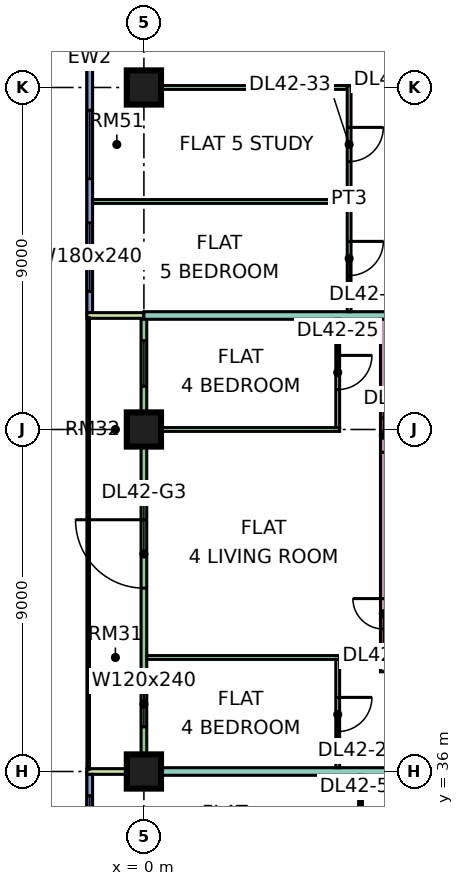
"""IFC4 building model, lengths in metres.
Left out: names, types, materials, properties, quantities, classifications, styles, units other than length and angle.
Written with IfcOpenShell. Run it as: python <this file> out.ifc"""

import sys

from ifc_helpers import new_model, si_unit, direction, frame, frame_2d, origin, origin_2d, place, context, subcontext, project, spatial, rectangle, extrude, element, fill, save


model = new_model("IFC4")
c1 = context("Model", 3, precision=1e-05, world=origin(), true_north=direction((0.0, 1.0)))
c2 = subcontext(c1, "Body", "Model", "MODEL_VIEW")
j1 = project(units=[si_unit("LENGTHUNIT", "METRE"), si_unit("PLANEANGLEUNIT", "RADIAN")], contexts=[c1])
p1 = place(None, origin())
s1 = spatial("IfcSite", under=j1, at=p1, CompositionType="ELEMENT")
p2 = place(p1, origin())
s2 = spatial("IfcBuilding", under=s1, at=p2, CompositionType="ELEMENT")
p3 = place(p2, frame((0.0, 0.0, 183.65)))
s3 = spatial("IfcBuildingStorey", under=s2, at=p3, CompositionType="ELEMENT", Elevation=183.65)
p4 = place(p3, frame((0.0, 36.0, 0.0), z_axis=(0.0, 0.0, 1.0), x_axis=(1.0, 0.0, 0.0)))
e1 = element("IfcColumn", 1, at=p4, inside=s3, PredefinedType="COLUMN", context=c2, shape_type="SweptSolid", body=[
    extrude(rectangle(XDim=0.9, YDim=0.9, at=origin_2d()), origin(), (0.0, 0.0, 1.0), 3.75),
])
p5 = place(p3, frame((0.0, 45.0, 0.0), z_axis=(0.0, 0.0, 1.0), x_axis=(1.0, 0.0, 0.0)))
e2 = element("IfcColumn", 2, at=p5, inside=s3, PredefinedType="COLUMN", context=c2, shape_type="SweptSolid", body=[
    extrude(rectangle(XDim=0.9, YDim=0.9, at=origin_2d()), origin(), (0.0, 0.0, 1.0), 3.75),
])
p6 = place(p3, frame((0.0, 54.0, 0.0), z_axis=(0.0, 0.0, 1.0), x_axis=(1.0, 0.0, 0.0)))
e3 = element("IfcColumn", 3, at=p6, inside=s3, PredefinedType="COLUMN", context=c2, shape_type="SweptSolid", body=[
    extrude(rectangle(XDim=0.9, YDim=0.9, at=origin_2d()), origin(), (0.0, 0.0, 1.0), 3.75),
])
p7 = place(p3, frame((-1.425, 61.5, 0.0), z_axis=(0.0, 0.0, 1.0), x_axis=(0.0, -1.0, 0.0)))
e4 = element("IfcWall", 4, at=p7, inside=s3, PredefinedType="SOLIDWALL", context=c2, shape_type="SweptSolid", body=[
    extrude(rectangle(XDim=13.425, YDim=0.15, at=frame_2d((6.712, 0.0))), origin(), (0.0, 0.0, 1.0), 3.35),
])
p8 = place(p7, frame((0.3, 0.0, 0.45)))
e5 = element("IfcOpeningElement", 5, at=p8, cuts=e4, PredefinedType="OPENING", context=c2, shape_type="SweptSolid", body=[
    extrude(rectangle(XDim=0.9, YDim=2.4, at=frame_2d((0.45, 1.2))), frame((0.0, 0.085, 0.0), z_axis=(0.0, -1.0, 0.0), x_axis=(1.0, 0.0, 0.0)), (0.0, 0.0, 1.0), 0.17),
])
p9 = place(p7, frame((2.1, 0.0, 0.45)))
e6 = element("IfcOpeningElement", 6, at=p9, cuts=e4, PredefinedType="OPENING", context=c2, shape_type="SweptSolid", body=[
    extrude(rectangle(XDim=4.8, YDim=2.4, at=frame_2d((2.4, 1.2))), frame((0.0, 0.085, 0.0), z_axis=(0.0, -1.0, 0.0), x_axis=(1.0, 0.0, 0.0)), (0.0, 0.0, 1.0), 0.17),
])
p10 = place(p7, frame((8.1, 0.0, 0.45)))
e7 = element("IfcOpeningElement", 7, at=p10, cuts=e4, PredefinedType="OPENING", context=c2, shape_type="SweptSolid", body=[
    extrude(rectangle(XDim=1.8, YDim=2.4, at=frame_2d((0.9, 1.2))), frame((0.0, 0.085, 0.0), z_axis=(0.0, -1.0, 0.0), x_axis=(1.0, 0.0, 0.0)), (0.0, 0.0, 1.0), 0.17),
])
p11 = place(p7, frame((11.062, 0.0, 0.45)))
e8 = element("IfcOpeningElement", 8, at=p11, cuts=e4, PredefinedType="OPENING", context=c2, shape_type="SweptSolid", body=[
    extrude(rectangle(XDim=1.8, YDim=2.4, at=frame_2d((0.9, 1.2))), frame((0.0, 0.085, 0.0), z_axis=(0.0, -1.0, 0.0), x_axis=(1.0, 0.0, 0.0)), (0.0, 0.0, 1.0), 0.17),
])
p12 = place(p3, frame((0.0, 47.925, 0.0), z_axis=(0.0, 0.0, 1.0), x_axis=(0.0, -1.0, 0.0)))
e9 = element("IfcWall", 9, at=p12, inside=s3, PredefinedType="SOLIDWALL", context=c2, shape_type="SweptSolid", body=[
    extrude(rectangle(XDim=11.85, YDim=0.15, at=frame_2d((5.925, 0.0))), origin(), (0.0, 0.0, 1.0), 3.35),
])
p13 = place(p12, frame((0.587, 0.0, 0.45)))
e10 = element("IfcOpeningElement", 10, at=p13, cuts=e9, PredefinedType="OPENING", context=c2, shape_type="SweptSolid", body=[
    extrude(rectangle(XDim=1.2, YDim=2.4, at=frame_2d((0.6, 1.2))), frame((0.0, 0.085, 0.0), z_axis=(0.0, -1.0, 0.0), x_axis=(1.0, 0.0, 0.0)), (0.0, 0.0, 1.0), 0.17),
])
p14 = place(p12, frame((5.3, 0.0, 0.0)))
e11 = element("IfcOpeningElement", 11, at=p14, cuts=e9, PredefinedType="OPENING", context=c2, shape_type="SweptSolid", body=[
    extrude(rectangle(XDim=1.8, YDim=2.4, at=frame_2d((0.9, 1.2))), frame((0.0, 0.085, 0.0), z_axis=(0.0, -1.0, 0.0), x_axis=(1.0, 0.0, 0.0)), (0.0, 0.0, 1.0), 0.17),
])
p15 = place(p12, frame((9.55, 0.0, 0.45)))
e12 = element("IfcOpeningElement", 12, at=p15, cuts=e9, PredefinedType="OPENING", context=c2, shape_type="SweptSolid", body=[
    extrude(rectangle(XDim=1.2, YDim=2.4, at=frame_2d((0.6, 1.2))), frame((0.0, 0.085, 0.0), z_axis=(0.0, -1.0, 0.0), x_axis=(1.0, 0.0, 0.0)), (0.0, 0.0, 1.0), 0.17),
])
for number, where, z_axis, x_axis in (
    (13, (-1.5, 48.0, 0.0), (0.0, 0.0, 1.0), (1.0, 0.0, 0.0)),
    (14, (-1.5, 36.0, 0.0), (0.0, 0.0, 1.0), (1.0, 0.0, 0.0)),
):
    element("IfcWall", number, at=place(p3, frame(where, z_axis=z_axis, x_axis=x_axis)), inside=s3, PredefinedType="SOLIDWALL", context=c2, shape_type="SweptSolid", body=[
        extrude(rectangle(XDim=1.5, YDim=0.15, at=frame_2d((0.75, 0.0))), origin(), (0.0, 0.0, 1.0), 3.35),
    ])
p16 = place(p3, frame((-1.425, 35.925, 0.0), z_axis=(0.0, 0.0, 1.0), x_axis=(0.0, -1.0, 0.0)))
e15 = element("IfcWall", 15, at=p16, inside=s3, PredefinedType="SOLIDWALL", context=c2, shape_type="SweptSolid", body=[
    extrude(rectangle(XDim=11.85, YDim=0.15, at=frame_2d((5.925, 0.0))), origin(), (0.0, 0.0, 1.0), 3.35),
])
p17 = place(p16, frame((0.562, 0.0, 0.45)))
e16 = element("IfcOpeningElement", 16, at=p17, cuts=e15, PredefinedType="OPENING", context=c2, shape_type="SweptSolid", body=[
    extrude(rectangle(XDim=1.8, YDim=2.4, at=frame_2d((0.9, 1.2))), frame((0.0, 0.085, 0.0), z_axis=(0.0, -1.0, 0.0), x_axis=(1.0, 0.0, 0.0)), (0.0, 0.0, 1.0), 0.17),
])
p18 = place(p16, frame((3.525, 0.0, 0.45)))
e17 = element("IfcOpeningElement", 17, at=p18, cuts=e15, PredefinedType="OPENING", context=c2, shape_type="SweptSolid", body=[
    extrude(rectangle(XDim=1.8, YDim=2.4, at=frame_2d((0.9, 1.2))), frame((0.0, 0.085, 0.0), z_axis=(0.0, -1.0, 0.0), x_axis=(1.0, 0.0, 0.0)), (0.0, 0.0, 1.0), 0.17),
])
p19 = place(p16, frame((7.387, 0.0, 0.45)))
e18 = element("IfcOpeningElement", 18, at=p19, cuts=e15, PredefinedType="OPENING", context=c2, shape_type="SweptSolid", body=[
    extrude(rectangle(XDim=3.0, YDim=2.4, at=frame_2d((1.5, 1.2))), frame((0.0, 0.085, 0.0), z_axis=(0.0, -1.0, 0.0), x_axis=(1.0, 0.0, 0.0)), (0.0, 0.0, 1.0), 0.17),
])
e19 = element("IfcWall", 19, at=p4, inside=s3, PredefinedType="PARTITIONING", context=c2, shape_type="SweptSolid", body=[
    extrude(rectangle(XDim=9.5, YDim=0.2, at=frame_2d((4.75, 0.0))), origin(), (0.0, 0.0, 1.0), 3.35),
])
p20 = place(p3, frame((0.0, 48.0, 0.0), z_axis=(0.0, 0.0, 1.0), x_axis=(1.0, 0.0, 0.0)))
e20 = element("IfcWall", 20, at=p20, inside=s3, PredefinedType="PARTITIONING", context=c2, shape_type="SweptSolid", body=[
    extrude(rectangle(XDim=6.375, YDim=0.2, at=frame_2d((3.188, 0.0))), origin(), (0.0, 0.0, 1.0), 3.35),
])
p21 = place(p3, frame((-1.35, 51.0, 0.0), z_axis=(0.0, 0.0, 1.0), x_axis=(1.0, 0.0, 0.0)))
e21 = element("IfcWall", 21, at=p21, inside=s3, PredefinedType="PARTITIONING", context=c2, shape_type="SweptSolid", body=[
    extrude(rectangle(XDim=6.7, YDim=0.1, at=frame_2d((3.35, 0.0))), origin(), (0.0, 0.0, 1.0), 3.35),
])
e22 = element("IfcWall", 22, at=p6, inside=s3, PredefinedType="PARTITIONING", context=c2, shape_type="SweptSolid", body=[
    extrude(rectangle(XDim=5.35, YDim=0.1, at=frame_2d((2.675, 0.0))), origin(), (0.0, 0.0, 1.0), 3.35),
])
for number, where, z_axis, x_axis in (
    (23, (0.074, 39.0, 0.0), (0.0, 0.0, 1.0), (1.0, 0.0, 0.0)),
    (24, (0.074, 45.0, 0.0), (0.0, 0.0, 1.0), (1.0, 0.0, 0.0)),
):
    element("IfcWall", number, at=place(p3, frame(where, z_axis=z_axis, x_axis=x_axis)), inside=s3, PredefinedType="PARTITIONING", context=c2, shape_type="SweptSolid", body=[
        extrude(rectangle(XDim=5.076, YDim=0.1, at=frame_2d((2.538, 0.0))), origin(), (0.0, 0.0, 1.0), 3.35),
    ])
p22 = place(p3, frame((5.1, 36.1, 0.0), z_axis=(0.0, 0.0, 1.0), x_axis=(0.0, 1.0, 0.0)))
e25 = element("IfcWall", 25, at=p22, inside=s3, PredefinedType="PARTITIONING", context=c2, shape_type="SweptSolid", body=[
    extrude(rectangle(XDim=2.85, YDim=0.1, at=frame_2d((1.425, 0.0))), origin(), (0.0, 0.0, 1.0), 3.35),
])
p23 = place(p22, frame((0.95, 0.0, 0.0)))
e26 = element("IfcOpeningElement", 26, at=p23, cuts=e25, PredefinedType="OPENING", context=c2, shape_type="SweptSolid", body=[
    extrude(rectangle(XDim=0.9, YDim=2.1, at=frame_2d((0.45, 1.05))), frame((0.0, 0.06, 0.0), z_axis=(0.0, -1.0, 0.0), x_axis=(1.0, 0.0, 0.0)), (0.0, 0.0, 1.0), 0.12),
])
p24 = place(p3, frame((5.1, 45.05, 0.0), z_axis=(0.0, 0.0, 1.0), x_axis=(0.0, 1.0, 0.0)))
e27 = element("IfcWall", 27, at=p24, inside=s3, PredefinedType="PARTITIONING", context=c2, shape_type="SweptSolid", body=[
    extrude(rectangle(XDim=2.85, YDim=0.1, at=frame_2d((1.425, 0.0))), origin(), (0.0, 0.0, 1.0), 3.35),
])
p25 = place(p24, frame((1.0, 0.0, 0.0)))
e28 = element("IfcOpeningElement", 28, at=p25, cuts=e27, PredefinedType="OPENING", context=c2, shape_type="SweptSolid", body=[
    extrude(rectangle(XDim=0.9, YDim=2.1, at=frame_2d((0.45, 1.05))), frame((0.0, 0.06, 0.0), z_axis=(0.0, -1.0, 0.0), x_axis=(1.0, 0.0, 0.0)), (0.0, 0.0, 1.0), 0.12),
])
p26 = place(p3, frame((5.4, 48.1, 0.0), z_axis=(0.0, 0.0, 1.0), x_axis=(0.0, 1.0, 0.0)))
e29 = element("IfcWall", 29, at=p26, inside=s3, PredefinedType="PARTITIONING", context=c2, shape_type="SweptSolid", body=[
    extrude(rectangle(XDim=5.95, YDim=0.1, at=frame_2d((2.975, 0.0))), origin(), (0.0, 0.0, 1.0), 3.35),
])
p27 = place(p26, frame((0.95, 0.0, 0.0)))
e30 = element("IfcOpeningElement", 30, at=p27, cuts=e29, PredefinedType="OPENING", context=c2, shape_type="SweptSolid", body=[
    extrude(rectangle(XDim=0.9, YDim=2.1, at=frame_2d((0.45, 1.05))), frame((0.0, 0.06, 0.0), z_axis=(0.0, -1.0, 0.0), x_axis=(1.0, 0.0, 0.0)), (0.0, 0.0, 1.0), 0.12),
])
p28 = place(p26, frame((3.95, 0.0, 0.0)))
e31 = element("IfcOpeningElement", 31, at=p28, cuts=e29, PredefinedType="OPENING", context=c2, shape_type="SweptSolid", body=[
    extrude(rectangle(XDim=0.9, YDim=2.1, at=frame_2d((0.45, 1.05))), frame((0.0, 0.06, 0.0), z_axis=(0.0, -1.0, 0.0), x_axis=(1.0, 0.0, 0.0)), (0.0, 0.0, 1.0), 0.12),
])
p29 = place(p3, frame((5.7, 29.95, 0.0), z_axis=(0.0, 0.0, 1.0), x_axis=(0.0, 1.0, 0.0)))
e32 = element("IfcWall", 32, at=p29, inside=s3, PredefinedType="PARTITIONING", context=c2, shape_type="SweptSolid", body=[
    extrude(rectangle(XDim=5.95, YDim=0.1, at=frame_2d((2.975, 0.0))), origin(), (0.0, 0.0, 1.0), 3.35),
])
p30 = place(p29, frame((1.1, 0.0, 0.0)))
e33 = element("IfcOpeningElement", 33, at=p30, cuts=e32, PredefinedType="OPENING", context=c2, shape_type="SweptSolid", body=[
    extrude(rectangle(XDim=0.9, YDim=2.1, at=frame_2d((0.45, 1.05))), frame((0.0, 0.06, 0.0), z_axis=(0.0, -1.0, 0.0), x_axis=(1.0, 0.0, 0.0)), (0.0, 0.0, 1.0), 0.12),
])
p31 = place(p29, frame((4.1, 0.0, 0.0)))
e34 = element("IfcOpeningElement", 34, at=p31, cuts=e32, PredefinedType="OPENING", context=c2, shape_type="SweptSolid", body=[
    extrude(rectangle(XDim=0.9, YDim=2.1, at=frame_2d((0.45, 1.05))), frame((0.0, 0.06, 0.0), z_axis=(0.0, -1.0, 0.0), x_axis=(1.0, 0.0, 0.0)), (0.0, 0.0, 1.0), 0.12),
])
p32 = place(p3, frame((6.3, 38.625, 0.0), z_axis=(0.0, 0.0, 1.0), x_axis=(0.0, 1.0, 0.0)))
e35 = element("IfcWall", 35, at=p32, inside=s3, PredefinedType="PARTITIONING", context=c2, shape_type="SweptSolid", body=[
    extrude(rectangle(XDim=9.275, YDim=0.15, at=frame_2d((4.637, 0.0))), origin(), (0.0, 0.0, 1.0), 3.35),
])
p33 = place(p32, frame((1.125, 0.0, 0.0)))
e36 = element("IfcOpeningElement", 36, at=p33, cuts=e35, PredefinedType="OPENING", context=c2, shape_type="SweptSolid", body=[
    extrude(rectangle(XDim=0.8, YDim=2.1, at=frame_2d((0.4, 1.05))), frame((0.0, 0.085, 0.0), z_axis=(0.0, -1.0, 0.0), x_axis=(1.0, 0.0, 0.0)), (0.0, 0.0, 1.0), 0.17),
])
p34 = place(p32, frame((5.775, 0.0, 0.0)))
e37 = element("IfcOpeningElement", 37, at=p34, cuts=e35, PredefinedType="OPENING", context=c2, shape_type="SweptSolid", body=[
    extrude(rectangle(XDim=0.9, YDim=2.1, at=frame_2d((0.45, 1.05))), frame((0.0, 0.085, 0.0), z_axis=(0.0, -1.0, 0.0), x_axis=(1.0, 0.0, 0.0)), (0.0, 0.0, 1.0), 0.17),
])
p35 = place(p9, origin())
e38 = element("IfcWindow", 38, at=p35, inside=s3, PartitioningType="SINGLE_PANEL", PredefinedType="WINDOW", context=c2, shape_type="SweptSolid", body=[
    extrude(rectangle(XDim=4.8, YDim=2.4, at=frame_2d((2.4, 1.2))), frame((0.0, 0.03, 0.0), z_axis=(0.0, -1.0, 0.0), x_axis=(1.0, 0.0, 0.0)), (0.0, 0.0, 1.0), 0.06),
])
fill(e6, e38)
p36 = place(p10, origin())
e39 = element("IfcWindow", 39, at=p36, inside=s3, PartitioningType="SINGLE_PANEL", PredefinedType="WINDOW", context=c2, shape_type="SweptSolid", body=[
    extrude(rectangle(XDim=1.8, YDim=2.4, at=frame_2d((0.9, 1.2))), frame((0.0, 0.03, 0.0), z_axis=(0.0, -1.0, 0.0), x_axis=(1.0, 0.0, 0.0)), (0.0, 0.0, 1.0), 0.06),
])
fill(e7, e39)
p37 = place(p11, origin())
e40 = element("IfcWindow", 40, at=p37, inside=s3, PartitioningType="SINGLE_PANEL", PredefinedType="WINDOW", context=c2, shape_type="SweptSolid", body=[
    extrude(rectangle(XDim=1.8, YDim=2.4, at=frame_2d((0.9, 1.2))), frame((0.0, 0.03, 0.0), z_axis=(0.0, -1.0, 0.0), x_axis=(1.0, 0.0, 0.0)), (0.0, 0.0, 1.0), 0.06),
])
fill(e8, e40)
p38 = place(p13, origin())
e41 = element("IfcWindow", 41, at=p38, inside=s3, PartitioningType="SINGLE_PANEL", PredefinedType="WINDOW", context=c2, shape_type="SweptSolid", body=[
    extrude(rectangle(XDim=1.2, YDim=2.4, at=frame_2d((0.6, 1.2))), frame((0.0, 0.03, 0.0), z_axis=(0.0, -1.0, 0.0), x_axis=(1.0, 0.0, 0.0)), (0.0, 0.0, 1.0), 0.06),
])
fill(e10, e41)
p39 = place(p14, frame((1.8, 0.0, 0.0), z_axis=(0.0, 0.0, 1.0), x_axis=(-1.0, 0.0, 0.0)))
e42 = element("IfcDoor", 42, at=p39, inside=s3, OperationType="DOUBLE_DOOR_SINGLE_SWING", PredefinedType="DOOR", context=c2, shape_type="SweptSolid", body=[
    extrude(rectangle(XDim=1.8, YDim=2.4, at=frame_2d((0.9, 1.2))), frame((0.0, 0.025, 0.0), z_axis=(0.0, -1.0, 0.0), x_axis=(1.0, 0.0, 0.0)), (0.0, 0.0, 1.0), 0.05),
])
fill(e11, e42)
p40 = place(p15, origin())
e43 = element("IfcWindow", 43, at=p40, inside=s3, PartitioningType="SINGLE_PANEL", PredefinedType="WINDOW", context=c2, shape_type="SweptSolid", body=[
    extrude(rectangle(XDim=1.2, YDim=2.4, at=frame_2d((0.6, 1.2))), frame((0.0, 0.03, 0.0), z_axis=(0.0, -1.0, 0.0), x_axis=(1.0, 0.0, 0.0)), (0.0, 0.0, 1.0), 0.06),
])
fill(e12, e43)
p41 = place(p17, origin())
e44 = element("IfcWindow", 44, at=p41, inside=s3, PartitioningType="SINGLE_PANEL", PredefinedType="WINDOW", context=c2, shape_type="SweptSolid", body=[
    extrude(rectangle(XDim=1.8, YDim=2.4, at=frame_2d((0.9, 1.2))), frame((0.0, 0.03, 0.0), z_axis=(0.0, -1.0, 0.0), x_axis=(1.0, 0.0, 0.0)), (0.0, 0.0, 1.0), 0.06),
])
fill(e16, e44)
p42 = place(p33, frame((0.8, 0.0, 0.0), z_axis=(0.0, 0.0, 1.0), x_axis=(-1.0, 0.0, 0.0)))
e45 = element("IfcDoor", 45, at=p42, inside=s3, OperationType="SINGLE_SWING_RIGHT", PredefinedType="DOOR", context=c2, shape_type="SweptSolid", body=[
    extrude(rectangle(XDim=0.8, YDim=2.1, at=frame_2d((0.4, 1.05))), frame((0.0, 0.025, 0.0), z_axis=(0.0, -1.0, 0.0), x_axis=(1.0, 0.0, 0.0)), (0.0, 0.0, 1.0), 0.05),
])
fill(e36, e45)
p43 = place(p23, origin())
e46 = element("IfcDoor", 46, at=p43, inside=s3, OperationType="SINGLE_SWING_RIGHT", PredefinedType="DOOR", context=c2, shape_type="SweptSolid", body=[
    extrude(rectangle(XDim=0.9, YDim=2.1, at=frame_2d((0.45, 1.05))), frame((0.0, 0.025, 0.0), z_axis=(0.0, -1.0, 0.0), x_axis=(1.0, 0.0, 0.0)), (0.0, 0.0, 1.0), 0.05),
])
fill(e26, e46)
p44 = place(p25, origin())
e47 = element("IfcDoor", 47, at=p44, inside=s3, OperationType="SINGLE_SWING_RIGHT", PredefinedType="DOOR", context=c2, shape_type="SweptSolid", body=[
    extrude(rectangle(XDim=0.9, YDim=2.1, at=frame_2d((0.45, 1.05))), frame((0.0, 0.025, 0.0), z_axis=(0.0, -1.0, 0.0), x_axis=(1.0, 0.0, 0.0)), (0.0, 0.0, 1.0), 0.05),
])
fill(e28, e47)
p45 = place(p34, frame((0.9, 0.0, 0.0), z_axis=(0.0, 0.0, 1.0), x_axis=(-1.0, 0.0, 0.0)))
e48 = element("IfcDoor", 48, at=p45, inside=s3, OperationType="SINGLE_SWING_LEFT", PredefinedType="DOOR", context=c2, shape_type="SweptSolid", body=[
    extrude(rectangle(XDim=0.9, YDim=2.1, at=frame_2d((0.45, 1.05))), frame((0.0, 0.025, 0.0), z_axis=(0.0, -1.0, 0.0), x_axis=(1.0, 0.0, 0.0)), (0.0, 0.0, 1.0), 0.05),
])
fill(e37, e48)
p46 = place(p27, origin())
e49 = element("IfcDoor", 49, at=p46, inside=s3, OperationType="SINGLE_SWING_RIGHT", PredefinedType="DOOR", context=c2, shape_type="SweptSolid", body=[
    extrude(rectangle(XDim=0.9, YDim=2.1, at=frame_2d((0.45, 1.05))), frame((0.0, 0.025, 0.0), z_axis=(0.0, -1.0, 0.0), x_axis=(1.0, 0.0, 0.0)), (0.0, 0.0, 1.0), 0.05),
])
fill(e30, e49)
p47 = place(p28, origin())
e50 = element("IfcDoor", 50, at=p47, inside=s3, OperationType="SINGLE_SWING_RIGHT", PredefinedType="DOOR", context=c2, shape_type="SweptSolid", body=[
    extrude(rectangle(XDim=0.9, YDim=2.1, at=frame_2d((0.45, 1.05))), frame((0.0, 0.025, 0.0), z_axis=(0.0, -1.0, 0.0), x_axis=(1.0, 0.0, 0.0)), (0.0, 0.0, 1.0), 0.05),
])
fill(e31, e50)
save(model, sys.argv[1])
